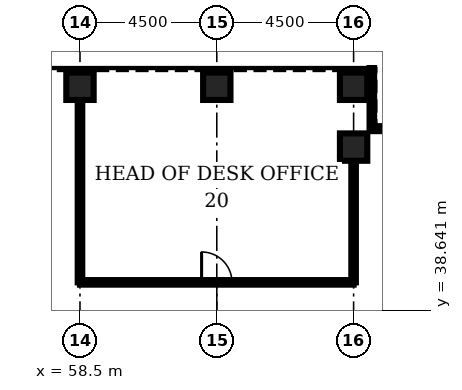
"""IFC4 building model, lengths in metres.
Left out: names, types, materials, properties, quantities, classifications, styles, units other than length and angle.
Written with IfcOpenShell. Run it as: python <this file> out.ifc"""

import sys

from ifc_helpers import new_model, si_unit, direction, frame, frame_2d, origin, origin_2d, place, context, subcontext, project, spatial, rectangle, hollow_rectangle, extrude, element, fill, save


model = new_model("IFC4")
c1 = context("Model", 3, precision=1e-05, world=origin(), true_north=direction((0.0, 1.0)))
c2 = subcontext(c1, "Body", "Model", "MODEL_VIEW")
j1 = project(units=[si_unit("LENGTHUNIT", "METRE"), si_unit("PLANEANGLEUNIT", "RADIAN")], contexts=[c1])
p1 = place(None, origin())
s1 = spatial("IfcSite", under=j1, at=p1, CompositionType="ELEMENT")
p2 = place(p1, origin())
s2 = spatial("IfcBuilding", under=s1, at=p2, CompositionType="ELEMENT")
p3 = place(p2, frame((0.0, 0.0, 50.0)))
s3 = spatial("IfcBuildingStorey", under=s2, at=p3, CompositionType="ELEMENT", Elevation=50.0)
for number, where, z_axis, x_axis in (
    (1, (67.5, 44.0, 0.0), (0.0, 0.0, 1.0), (0.0, 1.0, 0.0)),
    (2, (67.5, 46.0, 0.0), (0.0, 0.0, 1.0), (0.0, 1.0, 0.0)),
    (3, (63.0, 46.0, 0.0), (0.0, 0.0, 1.0), (0.0, 1.0, 0.0)),
    (4, (58.5, 46.0, 0.0), (0.0, 0.0, 1.0), (0.0, 1.0, 0.0)),
):
    element("IfcColumn", number, at=place(p3, frame(where, z_axis=z_axis, x_axis=x_axis)), inside=s3, PredefinedType="COLUMN", context=c2, shape_type="SweptSolid", body=[
        extrude(hollow_rectangle(XDim=0.9, YDim=0.9, WallThickness=0.12, at=origin_2d()), origin(), (0.0, 0.0, 1.0), 4.5),
    ])
p4 = place(p3, frame((58.5, 39.55, 0.0), z_axis=(0.0, 0.0, 1.0), x_axis=(1.0, 0.0, 0.0)))
e5 = element("IfcWall", 5, at=p4, inside=s3, PredefinedType="PARTITIONING", context=c2, shape_type="SweptSolid", body=[
    extrude(rectangle(XDim=9.0, YDim=0.15, at=frame_2d((4.5, 0.0))), origin(), (0.0, 0.0, 1.0), 3.0),
])
p5 = place(p4, frame((4.0, 0.0, 0.0)))
e6 = element("IfcOpeningElement", 6, at=p5, cuts=e5, PredefinedType="OPENING", context=c2, shape_type="SweptSolid", body=[
    extrude(rectangle(XDim=1.0, YDim=2.1, at=frame_2d((0.5, 1.05))), frame((0.0, 0.085, 0.0), z_axis=(0.0, -1.0, 0.0), x_axis=(1.0, 0.0, 0.0)), (0.0, 0.0, 1.0), 0.17),
])
p6 = place(p3, frame((58.5, 39.55, 0.0), z_axis=(0.0, 0.0, 1.0), x_axis=(0.0, 1.0, 0.0)))
e7 = element("IfcWall", 7, at=p6, inside=s3, PredefinedType="PARTITIONING", context=c2, shape_type="SweptSolid", body=[
    extrude(rectangle(XDim=6.0, YDim=0.15, at=frame_2d((3.0, 0.0))), origin(), (0.0, 0.0, 1.0), 3.0),
])
p7 = place(p3, frame((67.5, 39.55, 0.0), z_axis=(0.0, 0.0, 1.0), x_axis=(0.0, 1.0, 0.0)))
e8 = element("IfcWall", 8, at=p7, inside=s3, PredefinedType="PARTITIONING", context=c2, shape_type="SweptSolid", body=[
    extrude(rectangle(XDim=4.0, YDim=0.15, at=frame_2d((2.0, 0.0))), origin(), (0.0, 0.0, 1.0), 3.0),
])
p8 = place(p3, frame((70.35, 44.6, 0.0), z_axis=(0.0, 0.0, 1.0), x_axis=(-1.0, 0.0, 0.0)))
e9 = element("IfcWall", 9, at=p8, inside=s3, PredefinedType="ELEMENTEDWALL", context=c2, shape_type="SweptSolid", body=[
    extrude(rectangle(XDim=2.25, YDim=0.15, at=frame_2d((1.125, 0.0))), origin(), (0.0, 0.0, 1.0), 4.32),
])
p9 = place(p3, frame((68.1, 44.6, 0.0), z_axis=(0.0, 0.0, 1.0), x_axis=(0.0, 1.0, 0.0)))
e10 = element("IfcWall", 10, at=p9, inside=s3, PredefinedType="ELEMENTEDWALL", context=c2, shape_type="SweptSolid", body=[
    extrude(rectangle(XDim=2.0, YDim=0.15, at=frame_2d((1.0, 0.0))), origin(), (0.0, 0.0, 1.0), 4.32),
])
p10 = place(p5, origin())
e11 = element("IfcDoor", 11, at=p10, inside=s3, OperationType="SINGLE_SWING_LEFT", PredefinedType="DOOR", context=c2, shape_type="SweptSolid", body=[
    extrude(rectangle(XDim=1.0, YDim=2.1, at=frame_2d((0.5, 1.05))), frame((0.0, 0.025, 0.0), z_axis=(0.0, -1.0, 0.0), x_axis=(1.0, 0.0, 0.0)), (0.0, 0.0, 1.0), 0.05),
])
fill(e6, e11)
save(model, sys.argv[1])
